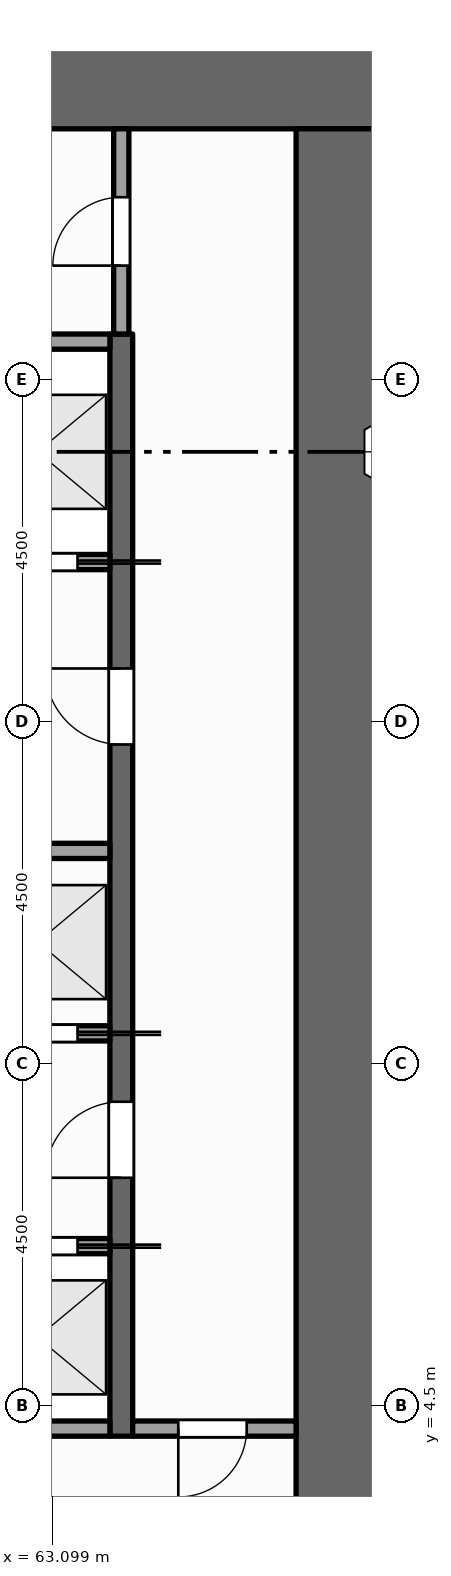
"""IFC4 building model, lengths in metres.
Left out: names, types, materials, properties, quantities, classifications, styles, units other than length and angle.
Written with IfcOpenShell. Run it as: python <this file> out.ifc"""

import sys

from ifc_helpers import new_model, si_unit, direction, frame, frame_2d, origin, place, context, subcontext, project, spatial, rectangle, extrude, element, fill, save


model = new_model("IFC4")
c1 = context("Model", 3, precision=1e-05, world=origin(), true_north=direction((0.0, 1.0)))
c2 = subcontext(c1, "Body", "Model", "MODEL_VIEW")
j1 = project(units=[si_unit("LENGTHUNIT", "METRE"), si_unit("PLANEANGLEUNIT", "RADIAN")], contexts=[c1])
p1 = place(None, origin())
s1 = spatial("IfcSite", under=j1, at=p1, CompositionType="ELEMENT")
p2 = place(p1, origin())
s2 = spatial("IfcBuilding", under=s1, at=p2, CompositionType="ELEMENT")
p3 = place(p2, frame((0.0, 0.0, 131.0)))
s3 = spatial("IfcBuildingStorey", under=s2, at=p3, CompositionType="ELEMENT", Elevation=131.0)
p4 = place(p3, frame((54.0, 21.9, -0.15), z_axis=(0.0, 0.0, 1.0), x_axis=(1.0, 0.0, 0.0)))
e1 = element("IfcWall", 1, at=p4, inside=s3, PredefinedType="SHEAR", context=c2, shape_type="SweptSolid", body=[
    extrude(rectangle(XDim=13.5, YDim=1.2, at=frame_2d((6.75, 0.0))), origin(), (0.0, 0.0, 1.0), 8.0),
])
p5 = place(p3, frame((66.9, 1.2, -0.15), z_axis=(0.0, 0.0, 1.0), x_axis=(0.0, 1.0, 0.0)))
e2 = element("IfcWall", 2, at=p5, inside=s3, PredefinedType="SHEAR", context=c2, shape_type="SweptSolid", body=[
    extrude(rectangle(XDim=20.1, YDim=1.2, at=frame_2d((10.05, 0.0))), origin(), (0.0, 0.0, 1.0), 8.0),
])
p6 = place(p3, frame((64.0, 4.1, 0.0), z_axis=(0.0, 0.0, 1.0), x_axis=(0.0, 1.0, 0.0)))
e3 = element("IfcWall", 3, at=p6, inside=s3, PredefinedType="SHEAR", context=c2, shape_type="SweptSolid", body=[
    extrude(rectangle(XDim=14.5, YDim=0.3, at=frame_2d((7.25, 0.0))), origin(), (0.0, 0.0, 1.0), 7.85),
])
p7 = place(p6, frame((3.4, 0.0, 0.0)))
e4 = element("IfcOpeningElement", 4, at=p7, cuts=e3, PredefinedType="OPENING", context=c2, shape_type="SweptSolid", body=[
    extrude(rectangle(XDim=1.0, YDim=2.1, at=frame_2d((0.5, 1.05))), frame((0.0, 0.16, 0.0), z_axis=(0.0, -1.0, 0.0), x_axis=(1.0, 0.0, 0.0)), (0.0, 0.0, 1.0), 0.32),
])
p8 = place(p6, frame((9.1, 0.0, 0.0)))
e5 = element("IfcOpeningElement", 5, at=p8, cuts=e3, PredefinedType="OPENING", context=c2, shape_type="SweptSolid", body=[
    extrude(rectangle(XDim=1.0, YDim=2.1, at=frame_2d((0.5, 1.05))), frame((0.0, 0.16, 0.0), z_axis=(0.0, -1.0, 0.0), x_axis=(1.0, 0.0, 0.0)), (0.0, 0.0, 1.0), 0.32),
])
p9 = place(p3, frame((64.0, 18.6, 0.0), z_axis=(0.0, 0.0, 1.0), x_axis=(0.0, 1.0, 0.0)))
e6 = element("IfcWall", 6, at=p9, inside=s3, PredefinedType="PARTITIONING", context=c2, shape_type="SweptSolid", body=[
    extrude(rectangle(XDim=2.7, YDim=0.2, at=frame_2d((1.35, 0.0))), origin(), (0.0, 0.0, 1.0), 7.85),
])
p10 = place(p9, frame((0.9, 0.0, 0.0)))
e7 = element("IfcOpeningElement", 7, at=p10, cuts=e6, PredefinedType="OPENING", context=c2, shape_type="SweptSolid", body=[
    extrude(rectangle(XDim=0.9, YDim=2.1, at=frame_2d((0.45, 1.05))), frame((0.0, 0.11, 0.0), z_axis=(0.0, -1.0, 0.0), x_axis=(1.0, 0.0, 0.0)), (0.0, 0.0, 1.0), 0.22),
])
p11 = place(p3, frame((61.9, 4.2, 0.0), z_axis=(0.0, 0.0, 1.0), x_axis=(1.0, 0.0, 0.0)))
e8 = element("IfcWall", 8, at=p11, inside=s3, PredefinedType="SOLIDWALL", context=c2, shape_type="SweptSolid", body=[
    extrude(rectangle(XDim=1.95, YDim=0.2, at=frame_2d((0.975, 0.0))), origin(), (0.0, 0.0, 1.0), 7.85),
])
p12 = place(p3, frame((64.15, 4.2, 0.0), z_axis=(0.0, 0.0, 1.0), x_axis=(1.0, 0.0, 0.0)))
e9 = element("IfcWall", 9, at=p12, inside=s3, PredefinedType="PARTITIONING", context=c2, shape_type="SweptSolid", body=[
    extrude(rectangle(XDim=2.15, YDim=0.2, at=frame_2d((1.075, 0.0))), origin(), (0.0, 0.0, 1.0), 7.85),
])
p13 = place(p12, frame((0.6, 0.0, 0.0)))
e10 = element("IfcOpeningElement", 10, at=p13, cuts=e9, PredefinedType="OPENING", context=c2, shape_type="SweptSolid", body=[
    extrude(rectangle(XDim=0.9, YDim=2.1, at=frame_2d((0.45, 1.05))), frame((0.0, 0.11, 0.0), z_axis=(0.0, -1.0, 0.0), x_axis=(1.0, 0.0, 0.0)), (0.0, 0.0, 1.0), 0.22),
])
p14 = place(p3, frame((61.9, 6.6, 0.0), z_axis=(0.0, 0.0, 1.0), x_axis=(1.0, 0.0, 0.0)))
e11 = element("IfcWall", 11, at=p14, inside=s3, PredefinedType="SOLIDWALL", context=c2, shape_type="SweptSolid", body=[
    extrude(rectangle(XDim=1.95, YDim=0.2, at=frame_2d((0.975, 0.0))), origin(), (0.0, 0.0, 1.0), 7.85),
])
p15 = place(p14, frame((0.425, 0.0, 0.012)))
e12 = element("IfcOpeningElement", 12, at=p15, cuts=e11, PredefinedType="OPENING", context=c2, shape_type="SweptSolid", body=[
    extrude(rectangle(XDim=1.1, YDim=2.1, at=frame_2d((0.55, 1.05))), frame((0.0, 0.11, 0.0), z_axis=(0.0, -1.0, 0.0), x_axis=(1.0, 0.0, 0.0)), (0.0, 0.0, 1.0), 0.22),
])
p16 = place(p3, frame((61.9, 9.4, 0.0), z_axis=(0.0, 0.0, 1.0), x_axis=(1.0, 0.0, 0.0)))
e13 = element("IfcWall", 13, at=p16, inside=s3, PredefinedType="SOLIDWALL", context=c2, shape_type="SweptSolid", body=[
    extrude(rectangle(XDim=1.95, YDim=0.2, at=frame_2d((0.975, 0.0))), origin(), (0.0, 0.0, 1.0), 7.85),
])
p17 = place(p16, frame((0.425, 0.0, 0.012)))
e14 = element("IfcOpeningElement", 14, at=p17, cuts=e13, PredefinedType="OPENING", context=c2, shape_type="SweptSolid", body=[
    extrude(rectangle(XDim=1.1, YDim=2.1, at=frame_2d((0.55, 1.05))), frame((0.0, 0.11, 0.0), z_axis=(0.0, -1.0, 0.0), x_axis=(1.0, 0.0, 0.0)), (0.0, 0.0, 1.0), 0.22),
])
p18 = place(p3, frame((61.9, 11.8, 0.0), z_axis=(0.0, 0.0, 1.0), x_axis=(1.0, 0.0, 0.0)))
e15 = element("IfcWall", 15, at=p18, inside=s3, PredefinedType="SOLIDWALL", context=c2, shape_type="SweptSolid", body=[
    extrude(rectangle(XDim=1.95, YDim=0.2, at=frame_2d((0.975, 0.0))), origin(), (0.0, 0.0, 1.0), 7.85),
])
p19 = place(p3, frame((61.9, 15.6, 0.0), z_axis=(0.0, 0.0, 1.0), x_axis=(1.0, 0.0, 0.0)))
e16 = element("IfcWall", 16, at=p19, inside=s3, PredefinedType="SOLIDWALL", context=c2, shape_type="SweptSolid", body=[
    extrude(rectangle(XDim=1.95, YDim=0.2, at=frame_2d((0.975, 0.0))), origin(), (0.0, 0.0, 1.0), 7.85),
])
p20 = place(p19, frame((0.425, 0.0, 0.012)))
e17 = element("IfcOpeningElement", 17, at=p20, cuts=e16, PredefinedType="OPENING", context=c2, shape_type="SweptSolid", body=[
    extrude(rectangle(XDim=1.1, YDim=2.1, at=frame_2d((0.55, 1.05))), frame((0.0, 0.11, 0.0), z_axis=(0.0, -1.0, 0.0), x_axis=(1.0, 0.0, 0.0)), (0.0, 0.0, 1.0), 0.22),
])
p21 = place(p3, frame((61.9, 18.5, 0.0), z_axis=(0.0, 0.0, 1.0), x_axis=(1.0, 0.0, 0.0)))
e18 = element("IfcWall", 18, at=p21, inside=s3, PredefinedType="SOLIDWALL", context=c2, shape_type="SweptSolid", body=[
    extrude(rectangle(XDim=1.95, YDim=0.2, at=frame_2d((0.975, 0.0))), origin(), (0.0, 0.0, 1.0), 7.85),
])
p22 = place(p15, origin())
e19 = element("IfcDoor", 19, at=p22, inside=s3, OperationType="SLIDING_TO_RIGHT", PredefinedType="DOOR", context=c2, shape_type="SweptSolid", body=[
    extrude(rectangle(XDim=1.1, YDim=2.1, at=frame_2d((0.55, 1.05))), frame((0.0, 0.025, 0.0), z_axis=(0.0, -1.0, 0.0), x_axis=(1.0, 0.0, 0.0)), (0.0, 0.0, 1.0), 0.05),
])
fill(e12, e19)
p23 = place(p17, origin())
e20 = element("IfcDoor", 20, at=p23, inside=s3, OperationType="SLIDING_TO_RIGHT", PredefinedType="DOOR", context=c2, shape_type="SweptSolid", body=[
    extrude(rectangle(XDim=1.1, YDim=2.1, at=frame_2d((0.55, 1.05))), frame((0.0, 0.025, 0.0), z_axis=(0.0, -1.0, 0.0), x_axis=(1.0, 0.0, 0.0)), (0.0, 0.0, 1.0), 0.05),
])
fill(e14, e20)
p24 = place(p20, origin())
e21 = element("IfcDoor", 21, at=p24, inside=s3, OperationType="SLIDING_TO_RIGHT", PredefinedType="DOOR", context=c2, shape_type="SweptSolid", body=[
    extrude(rectangle(XDim=1.1, YDim=2.1, at=frame_2d((0.55, 1.05))), frame((0.0, 0.025, 0.0), z_axis=(0.0, -1.0, 0.0), x_axis=(1.0, 0.0, 0.0)), (0.0, 0.0, 1.0), 0.05),
])
fill(e17, e21)
p25 = place(p7, origin())
e22 = element("IfcDoor", 22, at=p25, inside=s3, OperationType="SINGLE_SWING_LEFT", PredefinedType="DOOR", context=c2, shape_type="SweptSolid", body=[
    extrude(rectangle(XDim=1.0, YDim=2.1, at=frame_2d((0.5, 1.05))), frame((0.0, 0.025, 0.0), z_axis=(0.0, -1.0, 0.0), x_axis=(1.0, 0.0, 0.0)), (0.0, 0.0, 1.0), 0.05),
])
fill(e4, e22)
p26 = place(p8, origin())
e23 = element("IfcDoor", 23, at=p26, inside=s3, OperationType="SINGLE_SWING_RIGHT", PredefinedType="DOOR", context=c2, shape_type="SweptSolid", body=[
    extrude(rectangle(XDim=1.0, YDim=2.1, at=frame_2d((0.5, 1.05))), frame((0.0, 0.025, 0.0), z_axis=(0.0, -1.0, 0.0), x_axis=(1.0, 0.0, 0.0)), (0.0, 0.0, 1.0), 0.05),
])
fill(e5, e23)
p27 = place(p13, origin())
e24 = element("IfcDoor", 24, at=p27, inside=s3, OperationType="SINGLE_SWING_LEFT", PredefinedType="DOOR", context=c2, shape_type="SweptSolid", body=[
    extrude(rectangle(XDim=0.9, YDim=2.1, at=frame_2d((0.45, 1.05))), frame((0.0, 0.025, 0.0), z_axis=(0.0, -1.0, 0.0), x_axis=(1.0, 0.0, 0.0)), (0.0, 0.0, 1.0), 0.05),
])
fill(e10, e24)
p28 = place(p10, origin())
e25 = element("IfcDoor", 25, at=p28, inside=s3, OperationType="SINGLE_SWING_LEFT", PredefinedType="DOOR", context=c2, shape_type="SweptSolid", body=[
    extrude(rectangle(XDim=0.9, YDim=2.1, at=frame_2d((0.45, 1.05))), frame((0.0, 0.025, 0.0), z_axis=(0.0, -1.0, 0.0), x_axis=(1.0, 0.0, 0.0)), (0.0, 0.0, 1.0), 0.05),
])
fill(e7, e25)
save(model, sys.argv[1])
